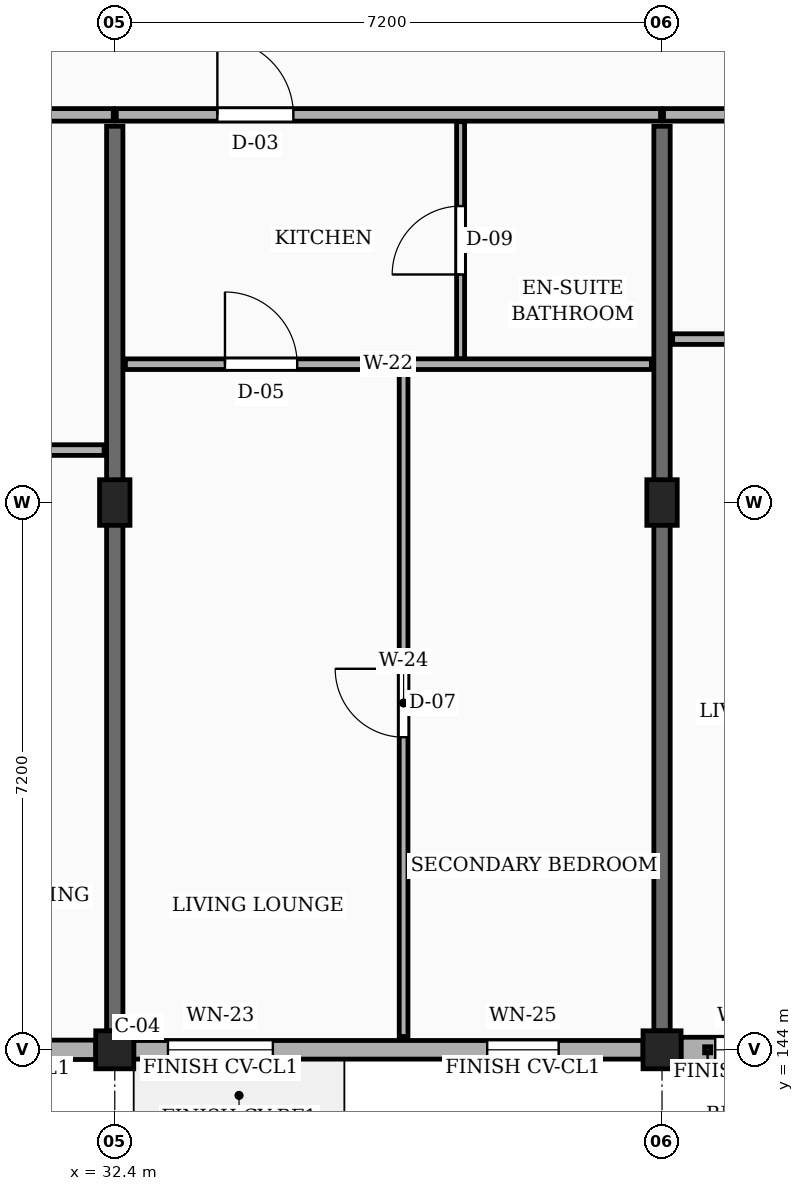
"""IFC4 building model, lengths in metres.
Left out: names, types, materials, properties, quantities, classifications, styles, units other than length and angle.
Written with IfcOpenShell. Run it as: python <this file> out.ifc"""

import sys

from ifc_helpers import new_model, si_unit, direction, frame, frame_2d, origin, origin_2d, place, context, subcontext, project, spatial, rectangle, extrude, element, fill, save


model = new_model("IFC4")
c1 = context("Model", 3, precision=1e-05, world=origin(), true_north=direction((0.0, 1.0)))
c2 = subcontext(c1, "Body", "Model", "MODEL_VIEW")
j1 = project(units=[si_unit("LENGTHUNIT", "METRE"), si_unit("PLANEANGLEUNIT", "RADIAN")], contexts=[c1])
p1 = place(None, origin())
s1 = spatial("IfcSite", under=j1, at=p1, CompositionType="ELEMENT")
p2 = place(p1, origin())
s2 = spatial("IfcBuilding", under=s1, at=p2, CompositionType="ELEMENT")
p3 = place(p2, frame((0.0, 0.0, 32.85)))
s3 = spatial("IfcBuildingStorey", under=s2, at=p3, CompositionType="ELEMENT", Elevation=32.85)
p4 = place(p3, frame((32.4, 144.0, 0.0), z_axis=(0.0, 0.0, 1.0), x_axis=(1.0, 0.0, 0.0)))
e1 = element("IfcColumn", 1, at=p4, inside=s3, PredefinedType="COLUMN", context=c2, shape_type="SweptSolid", body=[
    extrude(rectangle(XDim=0.5, YDim=0.5, at=origin_2d()), origin(), (0.0, 0.0, 1.0), 3.15),
])
p5 = place(p3, frame((32.4, 151.2, 0.0), z_axis=(0.0, 0.0, 1.0), x_axis=(1.0, 0.0, 0.0)))
e2 = element("IfcColumn", 2, at=p5, inside=s3, PredefinedType="COLUMN", context=c2, shape_type="SweptSolid", body=[
    extrude(rectangle(XDim=0.4, YDim=0.6, at=origin_2d()), origin(), (0.0, 0.0, 1.0), 3.15),
])
p6 = place(p3, frame((39.6, 144.0, 0.0), z_axis=(0.0, 0.0, 1.0), x_axis=(1.0, 0.0, 0.0)))
e3 = element("IfcColumn", 3, at=p6, inside=s3, PredefinedType="COLUMN", context=c2, shape_type="SweptSolid", body=[
    extrude(rectangle(XDim=0.5, YDim=0.5, at=origin_2d()), origin(), (0.0, 0.0, 1.0), 3.15),
])
p7 = place(p3, frame((39.6, 151.2, 0.0), z_axis=(0.0, 0.0, 1.0), x_axis=(1.0, 0.0, 0.0)))
e4 = element("IfcColumn", 4, at=p7, inside=s3, PredefinedType="COLUMN", context=c2, shape_type="SweptSolid", body=[
    extrude(rectangle(XDim=0.4, YDim=0.6, at=origin_2d()), origin(), (0.0, 0.0, 1.0), 3.15),
])
for number, where, z_axis, x_axis in (
    (5, (32.4, 144.25, 0.0), (0.0, 0.0, 1.0), (0.0, 1.0, 0.0)),
    (6, (39.6, 144.25, 0.0), (0.0, 0.0, 1.0), (0.0, 1.0, 0.0)),
):
    element("IfcWall", number, at=place(p3, frame(where, z_axis=z_axis, x_axis=x_axis)), inside=s3, PredefinedType="SOLIDWALL", context=c2, shape_type="SweptSolid", body=[
        extrude(rectangle(XDim=11.9, YDim=0.215, at=frame_2d((5.95, 0.0))), origin(), (0.0, 0.0, 1.0), 2.185),
    ])
p8 = place(p3, frame((25.45, 144.0, 0.0), z_axis=(0.0, 0.0, 1.0), x_axis=(1.0, 0.0, 0.0)))
e7 = element("IfcWall", 7, at=p8, inside=s3, PredefinedType="SOLIDWALL", context=c2, shape_type="SweptSolid", body=[
    extrude(rectangle(XDim=6.7, YDim=0.255, at=frame_2d((3.35, 0.0))), origin(), (0.0, 0.0, 1.0), 2.455),
])
p9 = place(p8, frame((0.45, 0.0, 0.78)))
e8 = element("IfcOpeningElement", 8, at=p9, cuts=e7, PredefinedType="OPENING", context=c2, shape_type="SweptSolid", body=[
    extrude(rectangle(XDim=1.22, YDim=1.36, at=frame_2d((0.61, 0.68))), frame((0.0, 0.137, 0.0), z_axis=(0.0, -1.0, 0.0), x_axis=(1.0, 0.0, 0.0)), (0.0, 0.0, 1.0), 0.275),
])
p10 = place(p8, frame((4.65, 0.0, 0.78)))
e9 = element("IfcOpeningElement", 9, at=p10, cuts=e7, PredefinedType="OPENING", context=c2, shape_type="SweptSolid", body=[
    extrude(rectangle(XDim=1.38, YDim=1.36, at=frame_2d((0.69, 0.68))), frame((0.0, 0.137, 0.0), z_axis=(0.0, -1.0, 0.0), x_axis=(1.0, 0.0, 0.0)), (0.0, 0.0, 1.0), 0.275),
])
p11 = place(p3, frame((32.65, 144.0, 0.0), z_axis=(0.0, 0.0, 1.0), x_axis=(1.0, 0.0, 0.0)))
e10 = element("IfcWall", 10, at=p11, inside=s3, PredefinedType="SOLIDWALL", context=c2, shape_type="SweptSolid", body=[
    extrude(rectangle(XDim=6.7, YDim=0.245, at=frame_2d((3.35, 0.0))), origin(), (0.0, 0.0, 1.0), 2.455),
])
p12 = place(p11, frame((0.45, 0.0, 0.78)))
e11 = element("IfcOpeningElement", 11, at=p12, cuts=e10, PredefinedType="OPENING", context=c2, shape_type="SweptSolid", body=[
    extrude(rectangle(XDim=1.38, YDim=1.36, at=frame_2d((0.69, 0.68))), frame((0.0, 0.133, 0.0), z_axis=(0.0, -1.0, 0.0), x_axis=(1.0, 0.0, 0.0)), (0.0, 0.0, 1.0), 0.265),
])
p13 = place(p11, frame((4.65, 0.0, 0.78)))
e12 = element("IfcOpeningElement", 12, at=p13, cuts=e10, PredefinedType="OPENING", context=c2, shape_type="SweptSolid", body=[
    extrude(rectangle(XDim=0.94, YDim=1.44, at=frame_2d((0.47, 0.72))), frame((0.0, 0.133, 0.0), z_axis=(0.0, -1.0, 0.0), x_axis=(1.0, 0.0, 0.0)), (0.0, 0.0, 1.0), 0.265),
])
p14 = place(p3, frame((39.85, 144.0, 0.0), z_axis=(0.0, 0.0, 1.0), x_axis=(1.0, 0.0, 0.0)))
e13 = element("IfcWall", 13, at=p14, inside=s3, PredefinedType="SOLIDWALL", context=c2, shape_type="SweptSolid", body=[
    extrude(rectangle(XDim=6.7, YDim=0.33, at=frame_2d((3.35, 0.0))), origin(), (0.0, 0.0, 1.0), 2.455),
])
p15 = place(p14, frame((0.45, 0.0, 0.78)))
e14 = element("IfcOpeningElement", 14, at=p15, cuts=e13, PredefinedType="OPENING", context=c2, shape_type="SweptSolid", body=[
    extrude(rectangle(XDim=0.94, YDim=1.44, at=frame_2d((0.47, 0.72))), frame((0.0, 0.175, 0.0), z_axis=(0.0, -1.0, 0.0), x_axis=(1.0, 0.0, 0.0)), (0.0, 0.0, 1.0), 0.35),
])
p16 = place(p14, frame((4.65, 0.0, 0.78)))
e15 = element("IfcOpeningElement", 15, at=p16, cuts=e13, PredefinedType="OPENING", context=c2, shape_type="SweptSolid", body=[
    extrude(rectangle(XDim=1.15, YDim=1.44, at=frame_2d((0.575, 0.72))), frame((0.0, 0.175, 0.0), z_axis=(0.0, -1.0, 0.0), x_axis=(1.0, 0.0, 0.0)), (0.0, 0.0, 1.0), 0.35),
])
p17 = place(p3, frame((25.22, 156.3, 0.0), z_axis=(0.0, 0.0, 1.0), x_axis=(1.0, 0.0, 0.0)))
e16 = element("IfcWall", 16, at=p17, inside=s3, PredefinedType="PARTITIONING", context=c2, shape_type="SweptSolid", body=[
    extrude(rectangle(XDim=7.16, YDim=0.165, at=frame_2d((3.58, 0.0))), origin(), (0.0, 0.0, 1.0), 2.32),
])
p18 = place(p17, frame((4.78, 0.0, 0.0)))
e17 = element("IfcOpeningElement", 17, at=p18, cuts=e16, PredefinedType="OPENING", context=c2, shape_type="SweptSolid", body=[
    extrude(rectangle(XDim=1.14, YDim=2.18, at=frame_2d((0.57, 1.09))), frame((0.0, 0.093, 0.0), z_axis=(0.0, -1.0, 0.0), x_axis=(1.0, 0.0, 0.0)), (0.0, 0.0, 1.0), 0.185),
])
p19 = place(p3, frame((32.42, 156.3, 0.0), z_axis=(0.0, 0.0, 1.0), x_axis=(1.0, 0.0, 0.0)))
e18 = element("IfcWall", 18, at=p19, inside=s3, PredefinedType="PARTITIONING", context=c2, shape_type="SweptSolid", body=[
    extrude(rectangle(XDim=7.16, YDim=0.165, at=frame_2d((3.58, 0.0))), origin(), (0.0, 0.0, 1.0), 2.32),
])
p20 = place(p19, frame((1.33, 0.0, 0.0)))
e19 = element("IfcOpeningElement", 19, at=p20, cuts=e18, PredefinedType="OPENING", context=c2, shape_type="SweptSolid", body=[
    extrude(rectangle(XDim=1.0, YDim=2.15, at=frame_2d((0.5, 1.075))), frame((0.0, 0.093, 0.0), z_axis=(0.0, -1.0, 0.0), x_axis=(1.0, 0.0, 0.0)), (0.0, 0.0, 1.0), 0.185),
])
p21 = place(p3, frame((39.62, 156.3, 0.0), z_axis=(0.0, 0.0, 1.0), x_axis=(1.0, 0.0, 0.0)))
e20 = element("IfcWall", 20, at=p21, inside=s3, PredefinedType="PARTITIONING", context=c2, shape_type="SweptSolid", body=[
    extrude(rectangle(XDim=7.16, YDim=0.165, at=frame_2d((3.58, 0.0))), origin(), (0.0, 0.0, 1.0), 2.32),
])
p22 = place(p21, frame((1.33, 0.0, 0.0)))
e21 = element("IfcOpeningElement", 21, at=p22, cuts=e20, PredefinedType="OPENING", context=c2, shape_type="SweptSolid", body=[
    extrude(rectangle(XDim=0.94, YDim=2.12, at=frame_2d((0.47, 1.06))), frame((0.0, 0.093, 0.0), z_axis=(0.0, -1.0, 0.0), x_axis=(1.0, 0.0, 0.0)), (0.0, 0.0, 1.0), 0.185),
])
p23 = place(p3, frame((25.34, 151.89, 0.0), z_axis=(0.0, 0.0, 1.0), x_axis=(1.0, 0.0, 0.0)))
e22 = element("IfcWall", 22, at=p23, inside=s3, PredefinedType="PARTITIONING", context=c2, shape_type="SweptSolid", body=[
    extrude(rectangle(XDim=6.92, YDim=0.14, at=frame_2d((3.46, 0.0))), origin(), (0.0, 0.0, 1.0), 2.32),
])
p24 = place(p23, frame((4.66, 0.0, 0.0)))
e23 = element("IfcOpeningElement", 23, at=p24, cuts=e22, PredefinedType="OPENING", context=c2, shape_type="SweptSolid", body=[
    extrude(rectangle(XDim=0.92, YDim=2.1, at=frame_2d((0.46, 1.05))), frame((0.0, 0.08, 0.0), z_axis=(0.0, -1.0, 0.0), x_axis=(1.0, 0.0, 0.0)), (0.0, 0.0, 1.0), 0.16),
])
p25 = place(p3, frame((36.2, 144.175, 0.0), z_axis=(0.0, 0.0, 1.0), x_axis=(0.0, 1.0, 0.0)))
e24 = element("IfcWall", 24, at=p25, inside=s3, PredefinedType="PARTITIONING", context=c2, shape_type="SweptSolid", body=[
    extrude(rectangle(XDim=8.775, YDim=0.115, at=frame_2d((4.387, 0.0))), origin(), (0.0, 0.0, 1.0), 2.32),
])
p26 = place(p25, frame((3.938, 0.0, 0.0)))
e25 = element("IfcOpeningElement", 25, at=p26, cuts=e24, PredefinedType="OPENING", context=c2, shape_type="SweptSolid", body=[
    extrude(rectangle(XDim=0.9, YDim=2.1, at=frame_2d((0.45, 1.05))), frame((0.0, 0.067, 0.0), z_axis=(0.0, -1.0, 0.0), x_axis=(1.0, 0.0, 0.0)), (0.0, 0.0, 1.0), 0.135),
])
p27 = place(p3, frame((36.95, 153.09, 0.0), z_axis=(0.0, 0.0, 1.0), x_axis=(0.0, 1.0, 0.0)))
e26 = element("IfcWall", 26, at=p27, inside=s3, PredefinedType="PARTITIONING", context=c2, shape_type="SweptSolid", body=[
    extrude(rectangle(XDim=3.12, YDim=0.105, at=frame_2d((1.56, 0.0))), origin(), (0.0, 0.0, 1.0), 2.32),
])
p28 = place(p27, frame((1.11, 0.0, 0.0)))
e27 = element("IfcOpeningElement", 27, at=p28, cuts=e26, PredefinedType="OPENING", context=c2, shape_type="SweptSolid", body=[
    extrude(rectangle(XDim=0.9, YDim=2.05, at=frame_2d((0.45, 1.025))), frame((0.0, 0.062, 0.0), z_axis=(0.0, -1.0, 0.0), x_axis=(1.0, 0.0, 0.0)), (0.0, 0.0, 1.0), 0.125),
])
p29 = place(p3, frame((32.54, 153.02, 0.0), z_axis=(0.0, 0.0, 1.0), x_axis=(1.0, 0.0, 0.0)))
e28 = element("IfcWall", 28, at=p29, inside=s3, PredefinedType="PARTITIONING", context=c2, shape_type="SweptSolid", body=[
    extrude(rectangle(XDim=6.92, YDim=0.14, at=frame_2d((3.46, 0.0))), origin(), (0.0, 0.0, 1.0), 2.32),
])
p30 = place(p29, frame((1.31, 0.0, 0.0)))
e29 = element("IfcOpeningElement", 29, at=p30, cuts=e28, PredefinedType="OPENING", context=c2, shape_type="SweptSolid", body=[
    extrude(rectangle(XDim=0.95, YDim=2.1, at=frame_2d((0.475, 1.05))), frame((0.0, 0.08, 0.0), z_axis=(0.0, -1.0, 0.0), x_axis=(1.0, 0.0, 0.0)), (0.0, 0.0, 1.0), 0.16),
])
p31 = place(p3, frame((39.74, 153.35, 0.0), z_axis=(0.0, 0.0, 1.0), x_axis=(1.0, 0.0, 0.0)))
e30 = element("IfcWall", 30, at=p31, inside=s3, PredefinedType="PARTITIONING", context=c2, shape_type="SweptSolid", body=[
    extrude(rectangle(XDim=6.92, YDim=0.14, at=frame_2d((3.46, 0.0))), origin(), (0.0, 0.0, 1.0), 2.32),
])
p32 = place(p31, frame((1.31, 0.0, 0.0)))
e31 = element("IfcOpeningElement", 31, at=p32, cuts=e30, PredefinedType="OPENING", context=c2, shape_type="SweptSolid", body=[
    extrude(rectangle(XDim=0.95, YDim=2.1, at=frame_2d((0.475, 1.05))), frame((0.0, 0.08, 0.0), z_axis=(0.0, -1.0, 0.0), x_axis=(1.0, 0.0, 0.0)), (0.0, 0.0, 1.0), 0.16),
])
p33 = place(p12, origin())
e32 = element("IfcWindow", 32, at=p33, inside=s3, PartitioningType="SINGLE_PANEL", PredefinedType="WINDOW", context=c2, shape_type="SweptSolid", body=[
    extrude(rectangle(XDim=1.38, YDim=1.36, at=frame_2d((0.69, 0.68))), frame((0.0, 0.03, 0.0), z_axis=(0.0, -1.0, 0.0), x_axis=(1.0, 0.0, 0.0)), (0.0, 0.0, 1.0), 0.06),
])
fill(e11, e32)
p34 = place(p13, origin())
e33 = element("IfcWindow", 33, at=p34, inside=s3, PartitioningType="SINGLE_PANEL", PredefinedType="WINDOW", context=c2, shape_type="SweptSolid", body=[
    extrude(rectangle(XDim=0.94, YDim=1.44, at=frame_2d((0.47, 0.72))), frame((0.0, 0.03, 0.0), z_axis=(0.0, -1.0, 0.0), x_axis=(1.0, 0.0, 0.0)), (0.0, 0.0, 1.0), 0.06),
])
fill(e12, e33)
p35 = place(p15, origin())
e34 = element("IfcWindow", 34, at=p35, inside=s3, PartitioningType="SINGLE_PANEL", PredefinedType="WINDOW", context=c2, shape_type="SweptSolid", body=[
    extrude(rectangle(XDim=0.94, YDim=1.44, at=frame_2d((0.47, 0.72))), frame((0.0, 0.03, 0.0), z_axis=(0.0, -1.0, 0.0), x_axis=(1.0, 0.0, 0.0)), (0.0, 0.0, 1.0), 0.06),
])
fill(e14, e34)
p36 = place(p20, origin())
e35 = element("IfcDoor", 35, at=p36, inside=s3, OperationType="SINGLE_SWING_LEFT", PredefinedType="DOOR", context=c2, shape_type="SweptSolid", body=[
    extrude(rectangle(XDim=1.0, YDim=2.15, at=frame_2d((0.5, 1.075))), frame((0.0, 0.025, 0.0), z_axis=(0.0, -1.0, 0.0), x_axis=(1.0, 0.0, 0.0)), (0.0, 0.0, 1.0), 0.05),
])
fill(e19, e35)
p37 = place(p26, origin())
e36 = element("IfcDoor", 36, at=p37, inside=s3, OperationType="SINGLE_SWING_RIGHT", PredefinedType="DOOR", context=c2, shape_type="SweptSolid", body=[
    extrude(rectangle(XDim=0.9, YDim=2.1, at=frame_2d((0.45, 1.05))), frame((0.0, 0.025, 0.0), z_axis=(0.0, -1.0, 0.0), x_axis=(1.0, 0.0, 0.0)), (0.0, 0.0, 1.0), 0.05),
])
fill(e25, e36)
p38 = place(p28, origin())
e37 = element("IfcDoor", 37, at=p38, inside=s3, OperationType="SINGLE_SWING_LEFT", PredefinedType="DOOR", context=c2, shape_type="SweptSolid", body=[
    extrude(rectangle(XDim=0.9, YDim=2.05, at=frame_2d((0.45, 1.025))), frame((0.0, 0.025, 0.0), z_axis=(0.0, -1.0, 0.0), x_axis=(1.0, 0.0, 0.0)), (0.0, 0.0, 1.0), 0.05),
])
fill(e27, e37)
p39 = place(p30, origin())
e38 = element("IfcDoor", 38, at=p39, inside=s3, OperationType="SINGLE_SWING_LEFT", PredefinedType="DOOR", context=c2, shape_type="SweptSolid", body=[
    extrude(rectangle(XDim=0.95, YDim=2.1, at=frame_2d((0.475, 1.05))), frame((0.0, 0.025, 0.0), z_axis=(0.0, -1.0, 0.0), x_axis=(1.0, 0.0, 0.0)), (0.0, 0.0, 1.0), 0.05),
])
fill(e29, e38)
save(model, sys.argv[1])
